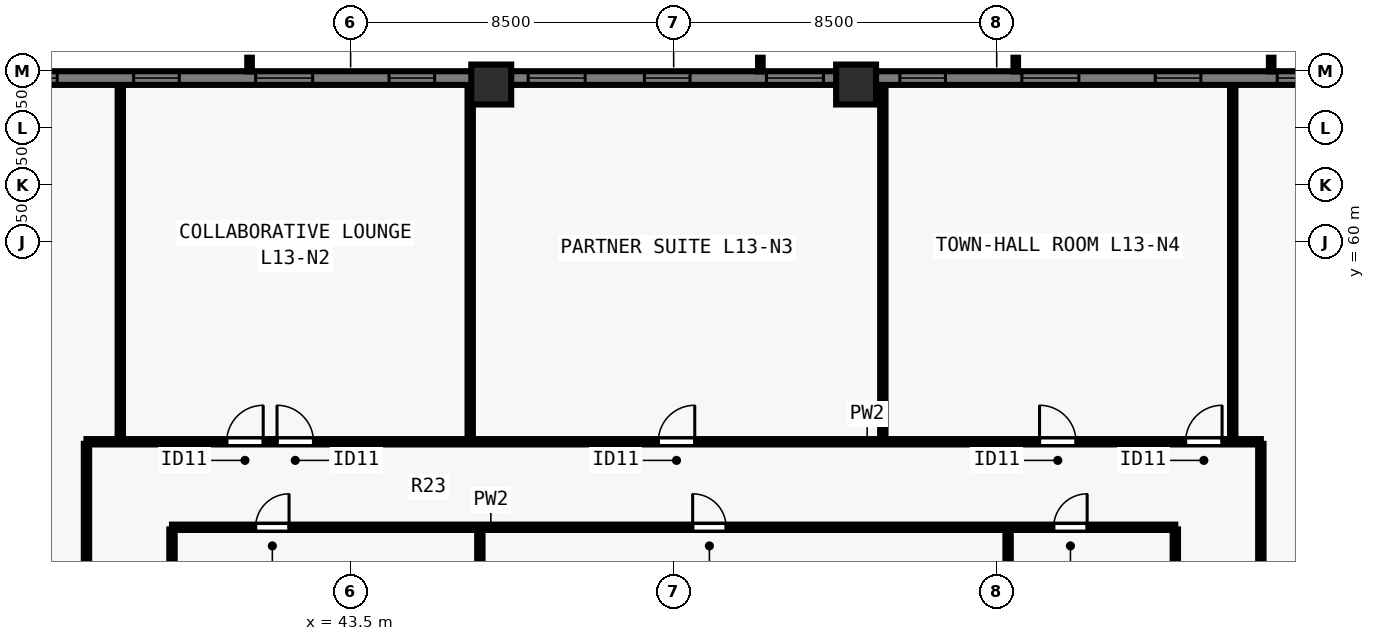
"""IFC4 building model, lengths in metres.
Left out: names, types, materials, properties, quantities, classifications, styles, units other than length and angle.
Written with IfcOpenShell. Run it as: python <this file> out.ifc"""

import sys

from ifc_helpers import new_model, si_unit, direction, frame, frame_2d, origin, origin_2d, place, context, subcontext, project, spatial, rectangle, extrude, element, fill, save


model = new_model("IFC4")
c1 = context("Model", 3, precision=1e-05, world=origin(), true_north=direction((0.0, 1.0)))
c2 = subcontext(c1, "Body", "Model", "MODEL_VIEW")
j1 = project(units=[si_unit("LENGTHUNIT", "METRE"), si_unit("PLANEANGLEUNIT", "RADIAN")], contexts=[c1])
p1 = place(None, origin())
s1 = spatial("IfcSite", under=j1, at=p1, CompositionType="ELEMENT")
p2 = place(p1, origin())
s2 = spatial("IfcBuilding", under=s1, at=p2, CompositionType="ELEMENT")
p3 = place(p2, frame((0.0, 0.0, 51.5)))
s3 = spatial("IfcBuildingStorey", under=s2, at=p3, CompositionType="ELEMENT", Elevation=51.5)
for number, where, z_axis, x_axis in (
    (1, (56.8, 64.15, 0.0), (0.0, 0.0, 1.0), (1.0, 0.0, 0.0)),
    (2, (47.2, 64.15, 0.0), (0.0, 0.0, 1.0), (1.0, 0.0, 0.0)),
):
    element("IfcColumn", number, at=place(p3, frame(where, z_axis=z_axis, x_axis=x_axis)), inside=s3, PredefinedType="COLUMN", context=c2, shape_type="SweptSolid", body=[
        extrude(rectangle(XDim=1.05, YDim=1.05, at=origin_2d()), origin(), (0.0, 0.0, 1.0), 3.5),
    ])
p4 = place(p3, frame((29.5, 64.32, 0.0), z_axis=(0.0, 0.0, 1.0), x_axis=(1.0, 0.0, 0.0)))
e3 = element("IfcWall", 3, at=p4, inside=s3, PredefinedType="SOLIDWALL", context=c2, shape_type="SweptSolid", body=[
    extrude(rectangle(XDim=44.662, YDim=0.36, at=frame_2d((22.331, 0.0))), origin(), (0.0, 0.0, 1.0), 3.28),
])
p5 = place(p4, frame((4.78, 0.0, 0.8)))
e4 = element("IfcOpeningElement", 4, at=p5, cuts=e3, PredefinedType="OPENING", context=c2, shape_type="SweptSolid", body=[
    extrude(rectangle(XDim=1.5, YDim=1.544, at=frame_2d((0.75, 0.772))), frame((0.0, 0.19, 0.0), z_axis=(0.0, -1.0, 0.0), x_axis=(1.0, 0.0, 0.0)), (0.0, 0.0, 1.0), 0.38),
])
p6 = place(p4, frame((8.29, 0.0, 0.8)))
e5 = element("IfcOpeningElement", 5, at=p6, cuts=e3, PredefinedType="OPENING", context=c2, shape_type="SweptSolid", body=[
    extrude(rectangle(XDim=1.2, YDim=1.544, at=frame_2d((0.6, 0.772))), frame((0.0, 0.19, 0.0), z_axis=(0.0, -1.0, 0.0), x_axis=(1.0, 0.0, 0.0)), (0.0, 0.0, 1.0), 0.38),
])
p7 = place(p4, frame((11.5, 0.0, 0.8)))
e6 = element("IfcOpeningElement", 6, at=p7, cuts=e3, PredefinedType="OPENING", context=c2, shape_type="SweptSolid", body=[
    extrude(rectangle(XDim=1.5, YDim=1.544, at=frame_2d((0.75, 0.772))), frame((0.0, 0.19, 0.0), z_axis=(0.0, -1.0, 0.0), x_axis=(1.0, 0.0, 0.0)), (0.0, 0.0, 1.0), 0.38),
])
p8 = place(p4, frame((15.01, 0.0, 0.8)))
e7 = element("IfcOpeningElement", 7, at=p8, cuts=e3, PredefinedType="OPENING", context=c2, shape_type="SweptSolid", body=[
    extrude(rectangle(XDim=1.2, YDim=1.544, at=frame_2d((0.6, 0.772))), frame((0.0, 0.19, 0.0), z_axis=(0.0, -1.0, 0.0), x_axis=(1.0, 0.0, 0.0)), (0.0, 0.0, 1.0), 0.38),
])
p9 = place(p4, frame((18.671, 0.0, 0.8)))
e8 = element("IfcOpeningElement", 8, at=p9, cuts=e3, PredefinedType="OPENING", context=c2, shape_type="SweptSolid", body=[
    extrude(rectangle(XDim=1.5, YDim=1.544, at=frame_2d((0.75, 0.772))), frame((0.0, 0.19, 0.0), z_axis=(0.0, -1.0, 0.0), x_axis=(1.0, 0.0, 0.0)), (0.0, 0.0, 1.0), 0.38),
])
p10 = place(p4, frame((21.731, 0.0, 0.8)))
e9 = element("IfcOpeningElement", 9, at=p10, cuts=e3, PredefinedType="OPENING", context=c2, shape_type="SweptSolid", body=[
    extrude(rectangle(XDim=1.2, YDim=1.544, at=frame_2d((0.6, 0.772))), frame((0.0, 0.19, 0.0), z_axis=(0.0, -1.0, 0.0), x_axis=(1.0, 0.0, 0.0)), (0.0, 0.0, 1.0), 0.38),
])
p11 = place(p4, frame((24.941, 0.0, 0.8)))
e10 = element("IfcOpeningElement", 10, at=p11, cuts=e3, PredefinedType="OPENING", context=c2, shape_type="SweptSolid", body=[
    extrude(rectangle(XDim=1.5, YDim=1.544, at=frame_2d((0.75, 0.772))), frame((0.0, 0.19, 0.0), z_axis=(0.0, -1.0, 0.0), x_axis=(1.0, 0.0, 0.0)), (0.0, 0.0, 1.0), 0.38),
])
p12 = place(p4, frame((28.451, 0.0, 0.8)))
e11 = element("IfcOpeningElement", 11, at=p12, cuts=e3, PredefinedType="OPENING", context=c2, shape_type="SweptSolid", body=[
    extrude(rectangle(XDim=1.2, YDim=1.544, at=frame_2d((0.6, 0.772))), frame((0.0, 0.19, 0.0), z_axis=(0.0, -1.0, 0.0), x_axis=(1.0, 0.0, 0.0)), (0.0, 0.0, 1.0), 0.38),
])
p13 = place(p4, frame((31.662, 0.0, 0.8)))
e12 = element("IfcOpeningElement", 12, at=p13, cuts=e3, PredefinedType="OPENING", context=c2, shape_type="SweptSolid", body=[
    extrude(rectangle(XDim=1.5, YDim=1.544, at=frame_2d((0.75, 0.772))), frame((0.0, 0.19, 0.0), z_axis=(0.0, -1.0, 0.0), x_axis=(1.0, 0.0, 0.0)), (0.0, 0.0, 1.0), 0.38),
])
p14 = place(p4, frame((35.172, 0.0, 0.8)))
e13 = element("IfcOpeningElement", 13, at=p14, cuts=e3, PredefinedType="OPENING", context=c2, shape_type="SweptSolid", body=[
    extrude(rectangle(XDim=1.2, YDim=1.544, at=frame_2d((0.6, 0.772))), frame((0.0, 0.19, 0.0), z_axis=(0.0, -1.0, 0.0), x_axis=(1.0, 0.0, 0.0)), (0.0, 0.0, 1.0), 0.38),
])
p15 = place(p4, frame((38.382, 0.0, 0.8)))
e14 = element("IfcOpeningElement", 14, at=p15, cuts=e3, PredefinedType="OPENING", context=c2, shape_type="SweptSolid", body=[
    extrude(rectangle(XDim=1.5, YDim=1.544, at=frame_2d((0.75, 0.772))), frame((0.0, 0.19, 0.0), z_axis=(0.0, -1.0, 0.0), x_axis=(1.0, 0.0, 0.0)), (0.0, 0.0, 1.0), 0.38),
])
p16 = place(p3, frame((36.55, 54.75, 0.0), z_axis=(0.0, 0.0, 1.0), x_axis=(1.0, 0.0, 0.0)))
e15 = element("IfcWall", 15, at=p16, inside=s3, PredefinedType="PARTITIONING", context=c2, shape_type="SweptSolid", body=[
    extrude(rectangle(XDim=30.9, YDim=0.14, at=frame_2d((15.45, 0.0))), origin(), (0.0, 0.0, 1.0), 3.28),
])
p17 = place(p16, frame((3.69, 0.0, 0.0)))
e16 = element("IfcOpeningElement", 16, at=p17, cuts=e15, PredefinedType="OPENING", context=c2, shape_type="SweptSolid", body=[
    extrude(rectangle(XDim=0.96, YDim=2.12, at=frame_2d((0.48, 1.06))), frame((0.0, 0.08, 0.0), z_axis=(0.0, -1.0, 0.0), x_axis=(1.0, 0.0, 0.0)), (0.0, 0.0, 1.0), 0.16),
])
p18 = place(p16, frame((5.013, 0.0, 0.0)))
e17 = element("IfcOpeningElement", 17, at=p18, cuts=e15, PredefinedType="OPENING", context=c2, shape_type="SweptSolid", body=[
    extrude(rectangle(XDim=0.96, YDim=2.12, at=frame_2d((0.48, 1.06))), frame((0.0, 0.08, 0.0), z_axis=(0.0, -1.0, 0.0), x_axis=(1.0, 0.0, 0.0)), (0.0, 0.0, 1.0), 0.16),
])
p19 = place(p16, frame((15.045, 0.0, 0.0)))
e18 = element("IfcOpeningElement", 18, at=p19, cuts=e15, PredefinedType="OPENING", context=c2, shape_type="SweptSolid", body=[
    extrude(rectangle(XDim=0.96, YDim=2.12, at=frame_2d((0.48, 1.06))), frame((0.0, 0.08, 0.0), z_axis=(0.0, -1.0, 0.0), x_axis=(1.0, 0.0, 0.0)), (0.0, 0.0, 1.0), 0.16),
])
p20 = place(p16, frame((25.077, 0.0, 0.0)))
e19 = element("IfcOpeningElement", 19, at=p20, cuts=e15, PredefinedType="OPENING", context=c2, shape_type="SweptSolid", body=[
    extrude(rectangle(XDim=0.96, YDim=2.12, at=frame_2d((0.48, 1.06))), frame((0.0, 0.08, 0.0), z_axis=(0.0, -1.0, 0.0), x_axis=(1.0, 0.0, 0.0)), (0.0, 0.0, 1.0), 0.16),
])
p21 = place(p16, frame((28.92, 0.0, 0.0)))
e20 = element("IfcOpeningElement", 20, at=p21, cuts=e15, PredefinedType="OPENING", context=c2, shape_type="SweptSolid", body=[
    extrude(rectangle(XDim=0.96, YDim=2.12, at=frame_2d((0.48, 1.06))), frame((0.0, 0.08, 0.0), z_axis=(0.0, -1.0, 0.0), x_axis=(1.0, 0.0, 0.0)), (0.0, 0.0, 1.0), 0.16),
])
p22 = place(p3, frame((36.55, 23.305, 0.0), z_axis=(0.0, 0.0, 1.0), x_axis=(0.0, 1.0, 0.0)))
e21 = element("IfcWall", 21, at=p22, inside=s3, PredefinedType="PARTITIONING", context=c2, shape_type="SweptSolid", body=[
    extrude(rectangle(XDim=31.39, YDim=0.14, at=frame_2d((15.695, 0.0))), origin(), (0.0, 0.0, 1.0), 3.28),
])
p23 = place(p22, frame((3.307, 0.0, 0.0)))
e22 = element("IfcOpeningElement", 22, at=p23, cuts=e21, PredefinedType="OPENING", context=c2, shape_type="SweptSolid", body=[
    extrude(rectangle(XDim=0.96, YDim=2.12, at=frame_2d((0.48, 1.06))), frame((0.0, 0.08, 0.0), z_axis=(0.0, -1.0, 0.0), x_axis=(1.0, 0.0, 0.0)), (0.0, 0.0, 1.0), 0.16),
])
p24 = place(p22, frame((11.25, 0.0, 0.0)))
e23 = element("IfcOpeningElement", 23, at=p24, cuts=e21, PredefinedType="OPENING", context=c2, shape_type="SweptSolid", body=[
    extrude(rectangle(XDim=0.96, YDim=2.12, at=frame_2d((0.48, 1.06))), frame((0.0, 0.08, 0.0), z_axis=(0.0, -1.0, 0.0), x_axis=(1.0, 0.0, 0.0)), (0.0, 0.0, 1.0), 0.16),
])
p25 = place(p22, frame((19.075, 0.0, 0.0)))
e24 = element("IfcOpeningElement", 24, at=p25, cuts=e21, PredefinedType="OPENING", context=c2, shape_type="SweptSolid", body=[
    extrude(rectangle(XDim=0.96, YDim=2.12, at=frame_2d((0.48, 1.06))), frame((0.0, 0.08, 0.0), z_axis=(0.0, -1.0, 0.0), x_axis=(1.0, 0.0, 0.0)), (0.0, 0.0, 1.0), 0.16),
])
p26 = place(p22, frame((26.782, 0.0, 0.0)))
e25 = element("IfcOpeningElement", 25, at=p26, cuts=e21, PredefinedType="OPENING", context=c2, shape_type="SweptSolid", body=[
    extrude(rectangle(XDim=0.96, YDim=2.12, at=frame_2d((0.48, 1.06))), frame((0.0, 0.08, 0.0), z_axis=(0.0, -1.0, 0.0), x_axis=(1.0, 0.0, 0.0)), (0.0, 0.0, 1.0), 0.16),
])
p27 = place(p3, frame((67.45, 23.305, 0.0), z_axis=(0.0, 0.0, 1.0), x_axis=(0.0, 1.0, 0.0)))
e26 = element("IfcWall", 26, at=p27, inside=s3, PredefinedType="PARTITIONING", context=c2, shape_type="SweptSolid", body=[
    extrude(rectangle(XDim=31.39, YDim=0.14, at=frame_2d((15.695, 0.0))), origin(), (0.0, 0.0, 1.0), 3.28),
])
p28 = place(p27, frame((7.561, 0.0, 0.0)))
e27 = element("IfcOpeningElement", 27, at=p28, cuts=e26, PredefinedType="OPENING", context=c2, shape_type="SweptSolid", body=[
    extrude(rectangle(XDim=0.96, YDim=2.12, at=frame_2d((0.48, 1.06))), frame((0.0, 0.08, 0.0), z_axis=(0.0, -1.0, 0.0), x_axis=(1.0, 0.0, 0.0)), (0.0, 0.0, 1.0), 0.16),
])
p29 = place(p27, frame((23.211, 0.0, 0.0)))
e28 = element("IfcOpeningElement", 28, at=p29, cuts=e26, PredefinedType="OPENING", context=c2, shape_type="SweptSolid", body=[
    extrude(rectangle(XDim=0.96, YDim=2.12, at=frame_2d((0.48, 1.06))), frame((0.0, 0.08, 0.0), z_axis=(0.0, -1.0, 0.0), x_axis=(1.0, 0.0, 0.0)), (0.0, 0.0, 1.0), 0.16),
])
p30 = place(p3, frame((38.8, 52.5, 0.0), z_axis=(0.0, 0.0, 1.0), x_axis=(1.0, 0.0, 0.0)))
e29 = element("IfcWall", 29, at=p30, inside=s3, PredefinedType="PARTITIONING", context=c2, shape_type="SweptSolid", body=[
    extrude(rectangle(XDim=26.4, YDim=0.14, at=frame_2d((13.2, 0.0))), origin(), (0.0, 0.0, 1.0), 3.28),
])
p31 = place(p30, frame((2.2, 0.0, 0.0)))
e30 = element("IfcOpeningElement", 30, at=p31, cuts=e29, PredefinedType="OPENING", context=c2, shape_type="SweptSolid", body=[
    extrude(rectangle(XDim=0.88, YDim=2.1, at=frame_2d((0.44, 1.05))), frame((0.0, 0.08, 0.0), z_axis=(0.0, -1.0, 0.0), x_axis=(1.0, 0.0, 0.0)), (0.0, 0.0, 1.0), 0.16),
])
p32 = place(p30, frame((13.7, 0.0, 0.0)))
e31 = element("IfcOpeningElement", 31, at=p32, cuts=e29, PredefinedType="OPENING", context=c2, shape_type="SweptSolid", body=[
    extrude(rectangle(XDim=0.88, YDim=2.1, at=frame_2d((0.44, 1.05))), frame((0.0, 0.08, 0.0), z_axis=(0.0, -1.0, 0.0), x_axis=(1.0, 0.0, 0.0)), (0.0, 0.0, 1.0), 0.16),
])
p33 = place(p30, frame((23.2, 0.0, 0.0)))
e32 = element("IfcOpeningElement", 32, at=p33, cuts=e29, PredefinedType="OPENING", context=c2, shape_type="SweptSolid", body=[
    extrude(rectangle(XDim=0.88, YDim=2.1, at=frame_2d((0.44, 1.05))), frame((0.0, 0.08, 0.0), z_axis=(0.0, -1.0, 0.0), x_axis=(1.0, 0.0, 0.0)), (0.0, 0.0, 1.0), 0.16),
])
p34 = place(p3, frame((38.8, 40.8, 0.0), z_axis=(0.0, 0.0, 1.0), x_axis=(0.0, 1.0, 0.0)))
e33 = element("IfcWall", 33, at=p34, inside=s3, PredefinedType="PARTITIONING", context=c2, shape_type="SweptSolid", body=[
    extrude(rectangle(XDim=11.645, YDim=0.14, at=frame_2d((5.823, 0.0))), origin(), (0.0, 0.0, 1.0), 3.28),
])
p35 = place(p34, frame((2.5, 0.0, 0.0)))
e34 = element("IfcOpeningElement", 34, at=p35, cuts=e33, PredefinedType="OPENING", context=c2, shape_type="SweptSolid", body=[
    extrude(rectangle(XDim=0.88, YDim=2.1, at=frame_2d((0.44, 1.05))), frame((0.0, 0.08, 0.0), z_axis=(0.0, -1.0, 0.0), x_axis=(1.0, 0.0, 0.0)), (0.0, 0.0, 1.0), 0.16),
])
p36 = place(p3, frame((65.2, 40.8, 0.0), z_axis=(0.0, 0.0, 1.0), x_axis=(0.0, 1.0, 0.0)))
e35 = element("IfcWall", 35, at=p36, inside=s3, PredefinedType="PARTITIONING", context=c2, shape_type="SweptSolid", body=[
    extrude(rectangle(XDim=11.645, YDim=0.14, at=frame_2d((5.823, 0.0))), origin(), (0.0, 0.0, 1.0), 3.28),
])
p37 = place(p36, frame((2.5, 0.0, 0.0)))
e36 = element("IfcOpeningElement", 36, at=p37, cuts=e35, PredefinedType="OPENING", context=c2, shape_type="SweptSolid", body=[
    extrude(rectangle(XDim=0.88, YDim=2.1, at=frame_2d((0.44, 1.05))), frame((0.0, 0.08, 0.0), z_axis=(0.0, -1.0, 0.0), x_axis=(1.0, 0.0, 0.0)), (0.0, 0.0, 1.0), 0.16),
])
p38 = place(p3, frame((46.9, 47.76, 0.0), z_axis=(0.0, 0.0, 1.0), x_axis=(0.0, 1.0, 0.0)))
e37 = element("IfcWall", 37, at=p38, inside=s3, PredefinedType="PARTITIONING", context=c2, shape_type="SweptSolid", body=[
    extrude(rectangle(XDim=4.685, YDim=0.14, at=frame_2d((2.343, 0.0))), origin(), (0.0, 0.0, 1.0), 3.28),
])
p39 = place(p3, frame((60.8, 47.76, 0.0), z_axis=(0.0, 0.0, 1.0), x_axis=(0.0, 1.0, 0.0)))
e38 = element("IfcWall", 38, at=p39, inside=s3, PredefinedType="PARTITIONING", context=c2, shape_type="SweptSolid", body=[
    extrude(rectangle(XDim=4.685, YDim=0.14, at=frame_2d((2.343, 0.0))), origin(), (0.0, 0.0, 1.0), 2.439),
])
for number, where, z_axis, x_axis in (
    (39, (37.439, 54.85, 0.0), (0.0, 0.0, 1.0), (0.0, 1.0, 0.0)),
    (40, (46.646, 54.85, 0.0), (0.0, 0.0, 1.0), (0.0, 1.0, 0.0)),
    (41, (57.503, 54.85, 0.0), (0.0, 0.0, 1.0), (0.0, 1.0, 0.0)),
):
    element("IfcWall", number, at=place(p3, frame(where, z_axis=z_axis, x_axis=x_axis)), inside=s3, PredefinedType="PARTITIONING", context=c2, shape_type="SweptSolid", body=[
        extrude(rectangle(XDim=9.23, YDim=0.14, at=frame_2d((4.615, 0.0))), origin(), (0.0, 0.0, 1.0), 3.28),
    ])
p40 = place(p3, frame((66.71, 54.85, 0.0), z_axis=(0.0, 0.0, 1.0), x_axis=(0.0, 1.0, 0.0)))
e42 = element("IfcWall", 42, at=p40, inside=s3, PredefinedType="PARTITIONING", context=c2, shape_type="SweptSolid", body=[
    extrude(rectangle(XDim=9.23, YDim=0.14, at=frame_2d((4.615, 0.0))), origin(), (0.0, 0.0, 1.0), 2.439),
])
p41 = place(p5, origin())
e43 = element("IfcWindow", 43, at=p41, inside=s3, PartitioningType="SINGLE_PANEL", PredefinedType="WINDOW", context=c2, shape_type="SweptSolid", body=[
    extrude(rectangle(XDim=1.5, YDim=1.544, at=frame_2d((0.75, 0.772))), frame((0.0, -0.05, 0.0), z_axis=(0.0, -1.0, 0.0), x_axis=(1.0, 0.0, 0.0)), (0.0, 0.0, 1.0), 0.06),
])
fill(e4, e43)
p42 = place(p6, origin())
e44 = element("IfcWindow", 44, at=p42, inside=s3, PartitioningType="SINGLE_PANEL", PredefinedType="WINDOW", context=c2, shape_type="SweptSolid", body=[
    extrude(rectangle(XDim=1.2, YDim=1.544, at=frame_2d((0.6, 0.772))), frame((0.0, -0.05, 0.0), z_axis=(0.0, -1.0, 0.0), x_axis=(1.0, 0.0, 0.0)), (0.0, 0.0, 1.0), 0.06),
])
fill(e5, e44)
p43 = place(p7, origin())
e45 = element("IfcWindow", 45, at=p43, inside=s3, PartitioningType="SINGLE_PANEL", PredefinedType="WINDOW", context=c2, shape_type="SweptSolid", body=[
    extrude(rectangle(XDim=1.5, YDim=1.544, at=frame_2d((0.75, 0.772))), frame((0.0, -0.05, 0.0), z_axis=(0.0, -1.0, 0.0), x_axis=(1.0, 0.0, 0.0)), (0.0, 0.0, 1.0), 0.06),
])
fill(e6, e45)
p44 = place(p8, origin())
e46 = element("IfcWindow", 46, at=p44, inside=s3, PartitioningType="SINGLE_PANEL", PredefinedType="WINDOW", context=c2, shape_type="SweptSolid", body=[
    extrude(rectangle(XDim=1.2, YDim=1.544, at=frame_2d((0.6, 0.772))), frame((0.0, -0.05, 0.0), z_axis=(0.0, -1.0, 0.0), x_axis=(1.0, 0.0, 0.0)), (0.0, 0.0, 1.0), 0.06),
])
fill(e7, e46)
p45 = place(p9, origin())
e47 = element("IfcWindow", 47, at=p45, inside=s3, PartitioningType="SINGLE_PANEL", PredefinedType="WINDOW", context=c2, shape_type="SweptSolid", body=[
    extrude(rectangle(XDim=1.5, YDim=1.544, at=frame_2d((0.75, 0.772))), frame((0.0, -0.05, 0.0), z_axis=(0.0, -1.0, 0.0), x_axis=(1.0, 0.0, 0.0)), (0.0, 0.0, 1.0), 0.06),
])
fill(e8, e47)
p46 = place(p10, origin())
e48 = element("IfcWindow", 48, at=p46, inside=s3, PartitioningType="SINGLE_PANEL", PredefinedType="WINDOW", context=c2, shape_type="SweptSolid", body=[
    extrude(rectangle(XDim=1.2, YDim=1.544, at=frame_2d((0.6, 0.772))), frame((0.0, -0.05, 0.0), z_axis=(0.0, -1.0, 0.0), x_axis=(1.0, 0.0, 0.0)), (0.0, 0.0, 1.0), 0.06),
])
fill(e9, e48)
p47 = place(p11, origin())
e49 = element("IfcWindow", 49, at=p47, inside=s3, PartitioningType="SINGLE_PANEL", PredefinedType="WINDOW", context=c2, shape_type="SweptSolid", body=[
    extrude(rectangle(XDim=1.5, YDim=1.544, at=frame_2d((0.75, 0.772))), frame((0.0, -0.05, 0.0), z_axis=(0.0, -1.0, 0.0), x_axis=(1.0, 0.0, 0.0)), (0.0, 0.0, 1.0), 0.06),
])
fill(e10, e49)
p48 = place(p12, origin())
e50 = element("IfcWindow", 50, at=p48, inside=s3, PartitioningType="SINGLE_PANEL", PredefinedType="WINDOW", context=c2, shape_type="SweptSolid", body=[
    extrude(rectangle(XDim=1.2, YDim=1.544, at=frame_2d((0.6, 0.772))), frame((0.0, -0.05, 0.0), z_axis=(0.0, -1.0, 0.0), x_axis=(1.0, 0.0, 0.0)), (0.0, 0.0, 1.0), 0.06),
])
fill(e11, e50)
p49 = place(p13, origin())
e51 = element("IfcWindow", 51, at=p49, inside=s3, PartitioningType="SINGLE_PANEL", PredefinedType="WINDOW", context=c2, shape_type="SweptSolid", body=[
    extrude(rectangle(XDim=1.5, YDim=1.544, at=frame_2d((0.75, 0.772))), frame((0.0, -0.05, 0.0), z_axis=(0.0, -1.0, 0.0), x_axis=(1.0, 0.0, 0.0)), (0.0, 0.0, 1.0), 0.06),
])
fill(e12, e51)
p50 = place(p14, origin())
e52 = element("IfcWindow", 52, at=p50, inside=s3, PartitioningType="SINGLE_PANEL", PredefinedType="WINDOW", context=c2, shape_type="SweptSolid", body=[
    extrude(rectangle(XDim=1.2, YDim=1.544, at=frame_2d((0.6, 0.772))), frame((0.0, -0.05, 0.0), z_axis=(0.0, -1.0, 0.0), x_axis=(1.0, 0.0, 0.0)), (0.0, 0.0, 1.0), 0.06),
])
fill(e13, e52)
p51 = place(p15, origin())
e53 = element("IfcWindow", 53, at=p51, inside=s3, PartitioningType="SINGLE_PANEL", PredefinedType="WINDOW", context=c2, shape_type="SweptSolid", body=[
    extrude(rectangle(XDim=1.5, YDim=1.544, at=frame_2d((0.75, 0.772))), frame((0.0, -0.05, 0.0), z_axis=(0.0, -1.0, 0.0), x_axis=(1.0, 0.0, 0.0)), (0.0, 0.0, 1.0), 0.06),
])
fill(e14, e53)
p52 = place(p31, origin())
e54 = element("IfcDoor", 54, at=p52, inside=s3, OperationType="SINGLE_SWING_RIGHT", PredefinedType="DOOR", context=c2, shape_type="SweptSolid", body=[
    extrude(rectangle(XDim=0.88, YDim=2.1, at=frame_2d((0.44, 1.05))), frame((0.0, 0.025, 0.0), z_axis=(0.0, -1.0, 0.0), x_axis=(1.0, 0.0, 0.0)), (0.0, 0.0, 1.0), 0.05),
])
fill(e30, e54)
p53 = place(p32, origin())
e55 = element("IfcDoor", 55, at=p53, inside=s3, OperationType="SINGLE_SWING_LEFT", PredefinedType="DOOR", context=c2, shape_type="SweptSolid", body=[
    extrude(rectangle(XDim=0.88, YDim=2.1, at=frame_2d((0.44, 1.05))), frame((0.0, 0.025, 0.0), z_axis=(0.0, -1.0, 0.0), x_axis=(1.0, 0.0, 0.0)), (0.0, 0.0, 1.0), 0.05),
])
fill(e31, e55)
p54 = place(p33, origin())
e56 = element("IfcDoor", 56, at=p54, inside=s3, OperationType="SINGLE_SWING_RIGHT", PredefinedType="DOOR", context=c2, shape_type="SweptSolid", body=[
    extrude(rectangle(XDim=0.88, YDim=2.1, at=frame_2d((0.44, 1.05))), frame((0.0, 0.025, 0.0), z_axis=(0.0, -1.0, 0.0), x_axis=(1.0, 0.0, 0.0)), (0.0, 0.0, 1.0), 0.05),
])
fill(e32, e56)
p55 = place(p17, origin())
e57 = element("IfcDoor", 57, at=p55, inside=s3, OperationType="SINGLE_SWING_RIGHT", PredefinedType="DOOR", context=c2, shape_type="SweptSolid", body=[
    extrude(rectangle(XDim=0.96, YDim=2.12, at=frame_2d((0.48, 1.06))), frame((0.0, 0.025, 0.0), z_axis=(0.0, -1.0, 0.0), x_axis=(1.0, 0.0, 0.0)), (0.0, 0.0, 1.0), 0.05),
])
fill(e16, e57)
p56 = place(p18, origin())
e58 = element("IfcDoor", 58, at=p56, inside=s3, OperationType="SINGLE_SWING_LEFT", PredefinedType="DOOR", context=c2, shape_type="SweptSolid", body=[
    extrude(rectangle(XDim=0.96, YDim=2.12, at=frame_2d((0.48, 1.06))), frame((0.0, 0.025, 0.0), z_axis=(0.0, -1.0, 0.0), x_axis=(1.0, 0.0, 0.0)), (0.0, 0.0, 1.0), 0.05),
])
fill(e17, e58)
p57 = place(p19, origin())
e59 = element("IfcDoor", 59, at=p57, inside=s3, OperationType="SINGLE_SWING_RIGHT", PredefinedType="DOOR", context=c2, shape_type="SweptSolid", body=[
    extrude(rectangle(XDim=0.96, YDim=2.12, at=frame_2d((0.48, 1.06))), frame((0.0, 0.025, 0.0), z_axis=(0.0, -1.0, 0.0), x_axis=(1.0, 0.0, 0.0)), (0.0, 0.0, 1.0), 0.05),
])
fill(e18, e59)
p58 = place(p20, origin())
e60 = element("IfcDoor", 60, at=p58, inside=s3, OperationType="SINGLE_SWING_LEFT", PredefinedType="DOOR", context=c2, shape_type="SweptSolid", body=[
    extrude(rectangle(XDim=0.96, YDim=2.12, at=frame_2d((0.48, 1.06))), frame((0.0, 0.025, 0.0), z_axis=(0.0, -1.0, 0.0), x_axis=(1.0, 0.0, 0.0)), (0.0, 0.0, 1.0), 0.05),
])
fill(e19, e60)
p59 = place(p21, origin())
e61 = element("IfcDoor", 61, at=p59, inside=s3, OperationType="SINGLE_SWING_RIGHT", PredefinedType="DOOR", context=c2, shape_type="SweptSolid", body=[
    extrude(rectangle(XDim=0.96, YDim=2.12, at=frame_2d((0.48, 1.06))), frame((0.0, 0.025, 0.0), z_axis=(0.0, -1.0, 0.0), x_axis=(1.0, 0.0, 0.0)), (0.0, 0.0, 1.0), 0.05),
])
fill(e20, e61)
save(model, sys.argv[1])
